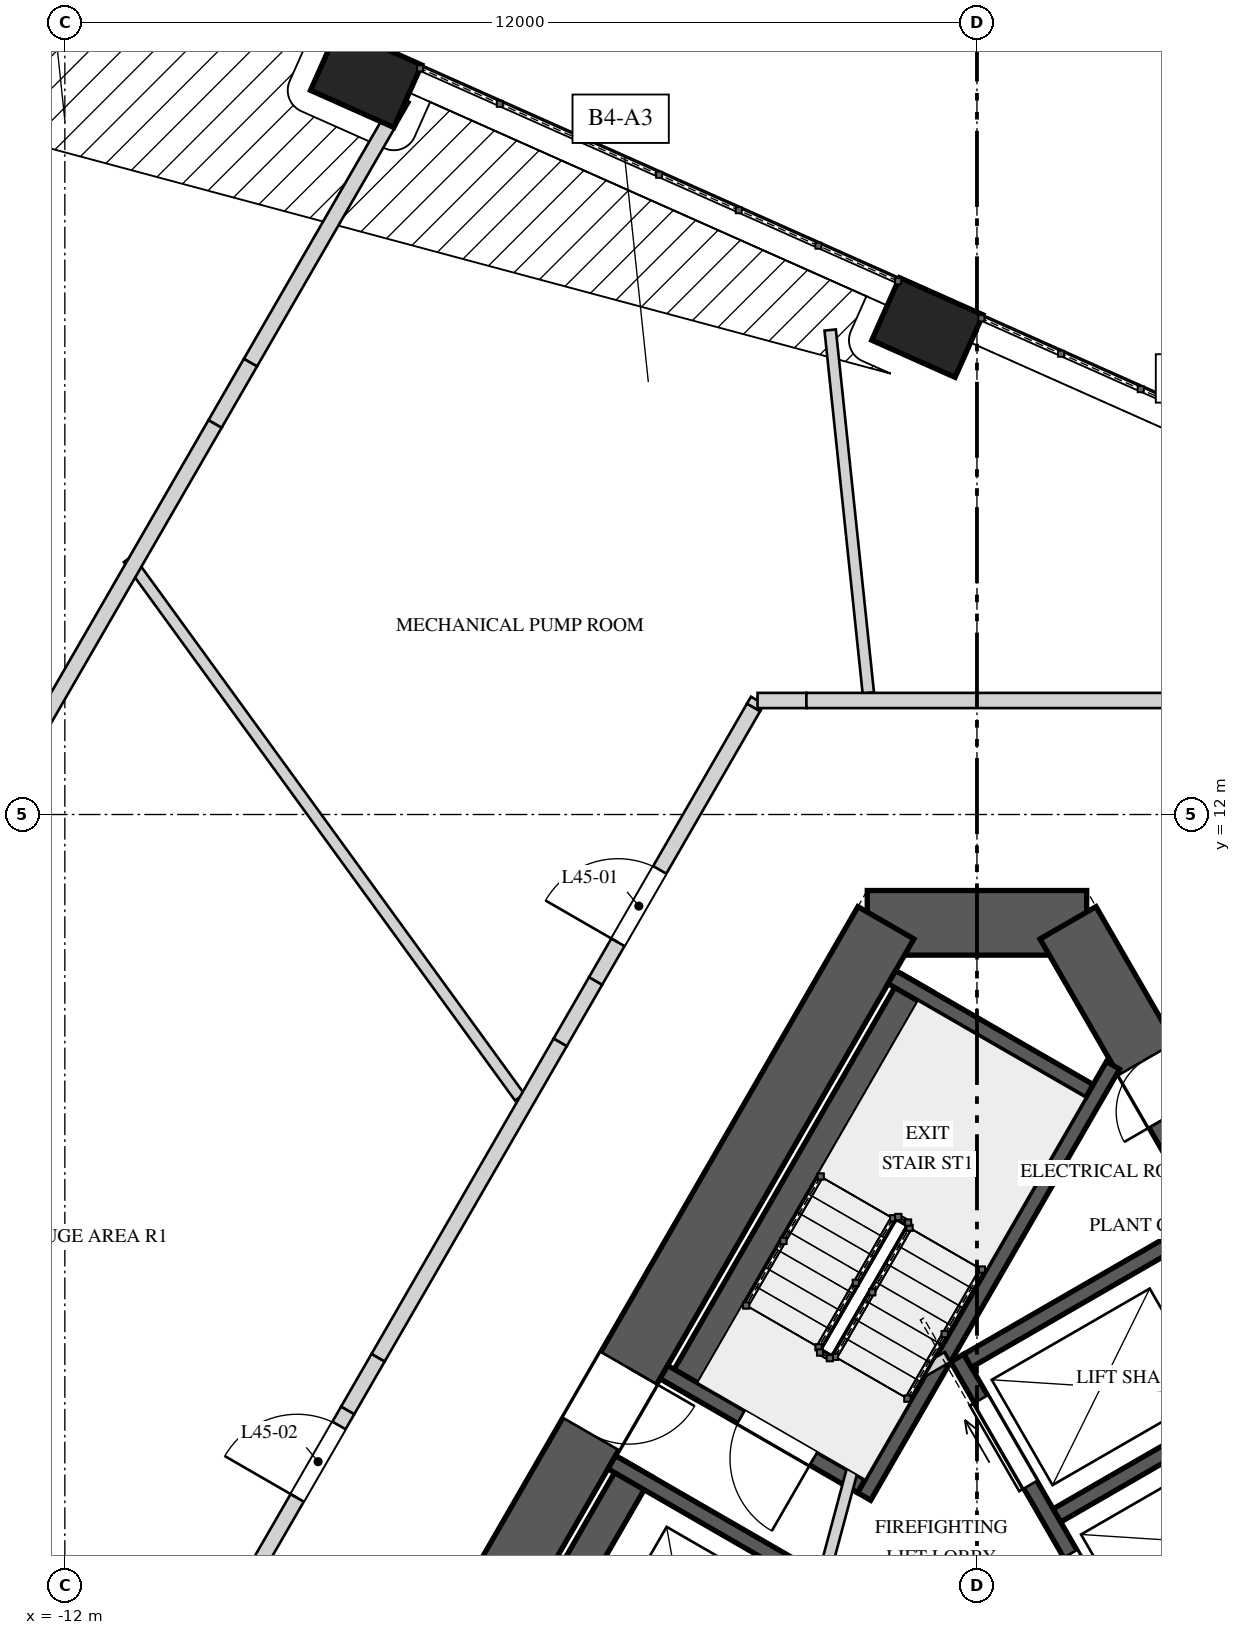
"""IFC4 building model, lengths in metres.
Left out: names, types, materials, properties, quantities, classifications, styles, units other than length and angle.
Written with IfcOpenShell. Run it as: python <this file> out.ifc"""

import sys

from ifc_helpers import new_model, si_unit, direction, frame, frame_2d, origin, origin_2d, place, context, subcontext, project, spatial, rectangle, extrude, element, fill, save


model = new_model("IFC4")
c1 = context("Model", 3, precision=1e-05, world=origin(), true_north=direction((0.0, 1.0)))
c2 = subcontext(c1, "Body", "Model", "MODEL_VIEW")
j1 = project(units=[si_unit("LENGTHUNIT", "METRE"), si_unit("PLANEANGLEUNIT", "RADIAN")], contexts=[c1])
p1 = place(None, origin())
s1 = spatial("IfcSite", under=j1, at=p1, CompositionType="ELEMENT")
p2 = place(p1, origin())
s2 = spatial("IfcBuilding", under=s1, at=p2, CompositionType="ELEMENT")
p3 = place(p2, frame((0.0, 0.0, 194.8)))
s3 = spatial("IfcBuildingStorey", under=s2, at=p3, CompositionType="ELEMENT", Elevation=194.8)
p4 = place(p3, frame((1.443, 10.575, 0.0), z_axis=(0.0, 0.0, 1.0), x_axis=(-1.0, 0.0, 0.0)))
e1 = element("IfcWall", 1, at=p4, inside=s3, PredefinedType="SHEAR", context=c2, shape_type="SweptSolid", body=[
    extrude(rectangle(XDim=2.887, YDim=0.85, at=frame_2d((1.443, 0.0))), origin(), (0.0, 0.0, 1.0), 5.2),
])
p5 = place(p3, frame((-1.198, 10.575, 0.0), z_axis=(0.0, 0.0, 1.0), x_axis=(-0.499995289315, -0.866028123483, 0.0)))
e2 = element("IfcWall", 2, at=p5, inside=s3, PredefinedType="SHEAR", context=c2, shape_type="SweptSolid", body=[
    extrude(rectangle(XDim=17.118, YDim=0.85, at=frame_2d((8.559, 0.0))), origin(), (0.0, 0.0, 1.0), 5.2),
])
p6 = place(p5, frame((6.764, 0.0, 0.0)))
e3 = element("IfcOpeningElement", 3, at=p6, cuts=e2, PredefinedType="OPENING", context=c2, shape_type="SweptSolid", body=[
    extrude(rectangle(XDim=1.0, YDim=2.4, at=frame_2d((0.5, 1.2))), frame((0.0, 0.435, 0.0), z_axis=(0.0, -1.0, 0.0), x_axis=(1.0, 0.0, 0.0)), (0.0, 0.0, 1.0), 0.87),
])
p7 = place(p3, frame((9.757, -4.25, 0.0), z_axis=(0.0, 0.0, 1.0), x_axis=(-0.499995289315, 0.866028123483, 0.0)))
e4 = element("IfcWall", 4, at=p7, inside=s3, PredefinedType="SHEAR", context=c2, shape_type="SweptSolid", body=[
    extrude(rectangle(XDim=17.118, YDim=0.85, at=frame_2d((8.559, 0.0))), origin(), (0.0, 0.0, 1.0), 5.2),
])
p8 = place(p7, frame((6.834, 0.0, 0.0)))
e5 = element("IfcOpeningElement", 5, at=p8, cuts=e4, PredefinedType="OPENING", context=c2, shape_type="SweptSolid", body=[
    extrude(rectangle(XDim=1.0, YDim=2.4, at=frame_2d((0.5, 1.2))), frame((0.0, 0.435, 0.0), z_axis=(0.0, -1.0, 0.0), x_axis=(1.0, 0.0, 0.0)), (0.0, 0.0, 1.0), 0.87),
])
p9 = place(p7, frame((14.252, 0.0, 0.0)))
e6 = element("IfcOpeningElement", 6, at=p9, cuts=e4, PredefinedType="OPENING", context=c2, shape_type="SweptSolid", body=[
    extrude(rectangle(XDim=0.8, YDim=2.1, at=frame_2d((0.4, 1.05))), frame((0.0, 0.435, 0.0), z_axis=(0.0, -1.0, 0.0), x_axis=(1.0, 0.0, 0.0)), (0.0, 0.0, 1.0), 0.87),
])
for number, where, z_axis, x_axis in (
    (7, (-0.653, 18.407, 0.0), (0.0, 0.0, 1.0), (-0.914, 0.407, 0.0)),
    (8, (-8.037, 21.694, 0.0), (0.0, 0.0, 1.0), (-0.914, 0.407, 0.0)),
):
    element("IfcColumn", number, at=place(p3, frame(where, z_axis=z_axis, x_axis=x_axis)), inside=s3, PredefinedType="COLUMN", context=c2, shape_type="SweptSolid", body=[
        extrude(rectangle(XDim=1.2, YDim=0.9, at=origin_2d()), origin(), (0.0, 0.0, 1.0), 2.835),
    ])
p10 = place(p3, frame((-0.788, 9.785, 0.0), z_axis=(0.0, 0.0, 1.0), x_axis=(-0.500009909098, -0.866019682689, 0.0)))
e9 = element("IfcWall", 9, at=p10, inside=s3, PredefinedType="SOLIDWALL", context=c2, shape_type="SweptSolid", body=[
    extrude(rectangle(XDim=6.2, YDim=0.45, at=frame_2d((3.1, 0.0))), origin(), (0.0, 0.0, 1.0), 4.85),
])
p11 = place(p3, frame((1.79, 8.7, 0.0), z_axis=(0.0, 0.0, 1.0), x_axis=(-0.499999959354, -0.866025427251, 0.0)))
e10 = element("IfcWall", 10, at=p11, inside=s3, PredefinedType="SOLIDWALL", context=c2, shape_type="SweptSolid", body=[
    extrude(rectangle(XDim=6.549, YDim=0.2, at=frame_2d((3.275, 0.0))), origin(), (0.0, 0.0, 1.0), 4.85),
])
p12 = place(p3, frame((1.479, 8.361, 0.0), z_axis=(0.0, 0.0, 1.0), x_axis=(-0.866031096941, 0.499990139034, 0.0)))
e11 = element("IfcWall", 11, at=p12, inside=s3, PredefinedType="SOLIDWALL", context=c2, shape_type="SweptSolid", body=[
    extrude(rectangle(XDim=3.0, YDim=0.2, at=frame_2d((1.5, 0.0))), origin(), (0.0, 0.0, 1.0), 4.85),
])
p13 = place(p3, frame((-1.521, 3.165, 0.0), z_axis=(0.0, 0.0, 1.0), x_axis=(-0.866031096941, 0.499990139034, 0.0)))
e12 = element("IfcWall", 12, at=p13, inside=s3, PredefinedType="SOLIDWALL", context=c2, shape_type="SweptSolid", body=[
    extrude(rectangle(XDim=3.0, YDim=0.2, at=frame_2d((1.5, 0.0))), origin(), (0.0, 0.0, 1.0), 4.85),
])
p14 = place(p13, frame((0.725, 0.0, 0.0)))
e13 = element("IfcOpeningElement", 13, at=p14, cuts=e12, PredefinedType="OPENING", context=c2, shape_type="SweptSolid", body=[
    extrude(rectangle(XDim=1.1, YDim=2.4, at=frame_2d((0.55, 1.2))), frame((0.0, 0.11, 0.0), z_axis=(0.0, -1.0, 0.0), x_axis=(1.0, 0.0, 0.0)), (0.0, 0.0, 1.0), 0.22),
])
p15 = place(p3, frame((-4.473, 3.402, 0.0), z_axis=(0.0, 0.0, 1.0), x_axis=(-0.499996545922, -0.866027397988, 0.0)))
e14 = element("IfcWall", 14, at=p15, inside=s3, PredefinedType="SOLIDWALL", context=c2, shape_type="SweptSolid", body=[
    extrude(rectangle(XDim=5.5, YDim=0.45, at=frame_2d((2.75, 0.0))), origin(), (0.0, 0.0, 1.0), 4.85),
])
p16 = place(p3, frame((-2.38, 2.078, 0.0), z_axis=(0.0, 0.0, 1.0), x_axis=(-0.866034573852, 0.49998411664, 0.0)))
e15 = element("IfcWall", 15, at=p16, inside=s3, PredefinedType="SOLIDWALL", context=c2, shape_type="SweptSolid", body=[
    extrude(rectangle(XDim=2.8, YDim=0.2, at=frame_2d((1.4, 0.0))), origin(), (0.0, 0.0, 1.0), 4.85),
])
p17 = place(p3, frame((2.19, 0.606, 0.0), z_axis=(0.0, 0.0, 1.0), x_axis=(-0.500002801628, 0.866023786258, 0.0)))
e16 = element("IfcWall", 16, at=p17, inside=s3, PredefinedType="SOLIDWALL", context=c2, shape_type="SweptSolid", body=[
    extrude(rectangle(XDim=4.9, YDim=0.2, at=frame_2d((2.45, 0.0))), origin(), (0.0, 0.0, 1.0), 4.85),
])
p18 = place(p17, frame((0.625, 0.0, 0.0)))
e17 = element("IfcOpeningElement", 17, at=p18, cuts=e16, PredefinedType="OPENING", context=c2, shape_type="SweptSolid", body=[
    extrude(rectangle(XDim=1.3, YDim=2.1, at=frame_2d((0.65, 1.05))), frame((0.0, 0.11, 0.0), z_axis=(0.0, -1.0, 0.0), x_axis=(1.0, 0.0, 0.0)), (0.0, 0.0, 1.0), 0.22),
])
p19 = place(p17, frame((2.975, 0.0, 0.0)))
e18 = element("IfcOpeningElement", 18, at=p19, cuts=e16, PredefinedType="OPENING", context=c2, shape_type="SweptSolid", body=[
    extrude(rectangle(XDim=1.3, YDim=2.1, at=frame_2d((0.65, 1.05))), frame((0.0, 0.11, 0.0), z_axis=(0.0, -1.0, 0.0), x_axis=(1.0, 0.0, 0.0)), (0.0, 0.0, 1.0), 0.22),
])
for number, where, z_axis, x_axis in (
    (19, (2.227, 0.743, 0.0), (0.0, 0.0, 1.0), (0.866, 0.5, 0.0)),
    (20, (1.052, 2.778, 0.0), (0.0, 0.0, 1.0), (0.866, 0.5, 0.0)),
    (21, (-0.123, 4.813, 0.0), (0.0, 0.0, 1.0), (0.866, 0.5, 0.0)),
):
    element("IfcWall", number, at=place(p3, frame(where, z_axis=z_axis, x_axis=x_axis)), inside=s3, PredefinedType="SOLIDWALL", context=c2, shape_type="SweptSolid", body=[
        extrude(rectangle(XDim=3.6, YDim=0.2, at=frame_2d((1.8, 0.0))), origin(), (0.0, 0.0, 1.0), 4.85),
    ])
p20 = place(p3, frame((-2.178, 1.372, 0.0), z_axis=(0.0, 0.0, 1.0), x_axis=(0.258808958833, 0.96592852884, 0.0)))
e22 = element("IfcWall", 22, at=p20, inside=s3, PredefinedType="PARTITIONING", context=c2, shape_type="SweptSolid", body=[
    extrude(rectangle(XDim=2.903, YDim=0.15, at=frame_2d((1.451, 0.0))), origin(), (0.0, 0.0, 1.0), 4.85),
])
p21 = place(p3, frame((-1.51, 4.215, 0.0), z_axis=(0.0, 0.0, 1.0), x_axis=(0.866085525409, 0.49989585183, 0.0)))
e23 = element("IfcWall", 23, at=p21, inside=s3, PredefinedType="PARTITIONING", context=c2, shape_type="SweptSolid", body=[
    extrude(rectangle(XDim=1.3, YDim=0.15, at=frame_2d((0.65, 0.0))), origin(), (0.0, 0.0, 1.0), 4.85),
])
p22 = place(p3, frame((-6.016, 8.28, 0.0), z_axis=(0.0, 0.0, 1.0), x_axis=(-0.587788699653, 0.809014489709, 0.0)))
e24 = element("IfcWall", 24, at=p22, inside=s3, PredefinedType="PARTITIONING", context=c2, shape_type="SweptSolid", body=[
    extrude(rectangle(XDim=8.757, YDim=0.15, at=frame_2d((4.378, 0.0))), origin(), (0.0, 0.0, 1.0), 4.85),
])
p23 = place(p3, frame((-1.931, 18.374, 0.0), z_axis=(0.0, 0.0, 1.0), x_axis=(0.104517989015, -0.994522996201, 0.0)))
e25 = element("IfcWall", 25, at=p23, inside=s3, PredefinedType="PARTITIONING", context=c2, shape_type="SweptSolid", body=[
    extrude(rectangle(XDim=4.8, YDim=0.15, at=frame_2d((2.4, 0.0))), origin(), (0.0, 0.0, 1.0), 4.85),
])
p24 = place(p3, frame((-9.427, 2.172, 0.0), z_axis=(0.0, 0.0, 1.0), x_axis=(0.500013761451, 0.866017458461, 0.0)))
e26 = element("IfcWall", 26, at=p24, inside=s3, PredefinedType="SOLIDWALL", context=c2, shape_type="SweptSolid", body=[
    extrude(rectangle(XDim=2.297, YDim=0.2, at=frame_2d((1.149, 0.0))), origin(), (0.0, 0.0, 1.0), 4.85),
])
p25 = place(p24, frame((0.967, 0.0, 0.0)))
e27 = element("IfcOpeningElement", 27, at=p25, cuts=e26, PredefinedType="OPENING", context=c2, shape_type="SweptSolid", body=[
    extrude(rectangle(XDim=1.1, YDim=2.2, at=frame_2d((0.55, 1.1))), frame((0.0, 0.11, 0.0), z_axis=(0.0, -1.0, 0.0), x_axis=(1.0, 0.0, 0.0)), (0.0, 0.0, 1.0), 0.22),
])
p26 = place(p3, frame((-8.278, 4.162, 0.0), z_axis=(0.0, 0.0, 1.0), x_axis=(0.500109828528, 0.865961984968, 0.0)))
e28 = element("IfcWall", 28, at=p26, inside=s3, PredefinedType="SOLIDWALL", context=c2, shape_type="SweptSolid", body=[
    extrude(rectangle(XDim=0.8, YDim=0.2, at=frame_2d((0.4, 0.0))), origin(), (0.0, 0.0, 1.0), 3.95),
])
p27 = place(p3, frame((-7.878, 4.854, 0.0), z_axis=(0.0, 0.0, 1.0), x_axis=(0.499997407846, 0.86602690036, 0.0)))
e29 = element("IfcWall", 29, at=p27, inside=s3, PredefinedType="SOLIDWALL", context=c2, shape_type="SweptSolid", body=[
    extrude(rectangle(XDim=4.791, YDim=0.2, at=frame_2d((2.396, 0.0))), origin(), (0.0, 0.0, 1.0), 4.85),
])
p28 = place(p3, frame((-5.483, 9.004, 0.0), z_axis=(0.0, 0.0, 1.0), x_axis=(0.499971966783, 0.866041588165, 0.0)))
e30 = element("IfcWall", 30, at=p28, inside=s3, PredefinedType="SOLIDWALL", context=c2, shape_type="SweptSolid", body=[
    extrude(rectangle(XDim=0.932, YDim=0.2, at=frame_2d((0.466, 0.0))), origin(), (0.0, 0.0, 1.0), 3.95),
])
p29 = place(p3, frame((-5.017, 9.811, 0.0), z_axis=(0.0, 0.0, 1.0), x_axis=(0.499993700073, 0.866029041019, 0.0)))
e31 = element("IfcWall", 31, at=p29, inside=s3, PredefinedType="SOLIDWALL", context=c2, shape_type="SweptSolid", body=[
    extrude(rectangle(XDim=4.155, YDim=0.2, at=frame_2d((2.078, 0.0))), origin(), (0.0, 0.0, 1.0), 4.85),
])
p30 = place(p29, frame((0.587, 0.0, 0.0)))
e32 = element("IfcOpeningElement", 32, at=p30, cuts=e31, PredefinedType="OPENING", context=c2, shape_type="SweptSolid", body=[
    extrude(rectangle(XDim=1.1, YDim=2.2, at=frame_2d((0.55, 1.1))), frame((0.0, 0.11, 0.0), z_axis=(0.0, -1.0, 0.0), x_axis=(1.0, 0.0, 0.0)), (0.0, 0.0, 1.0), 0.22),
])
p31 = place(p3, frame((-2.939, 13.409, 0.0), z_axis=(0.0, 0.0, 1.0), x_axis=(0.500393920955, 0.865797853931, 0.0)))
e33 = element("IfcWall", 33, at=p31, inside=s3, PredefinedType="SOLIDWALL", context=c2, shape_type="SweptSolid", body=[
    extrude(rectangle(XDim=0.105, YDim=0.2, at=frame_2d((0.052, 0.0))), origin(), (0.0, 0.0, 1.0), 4.15),
])
p32 = place(p3, frame((-2.887, 13.5, 0.0), z_axis=(0.0, 0.0, 1.0), x_axis=(1.0, 0.0, 0.0)))
e34 = element("IfcWall", 34, at=p32, inside=s3, PredefinedType="SOLIDWALL", context=c2, shape_type="SweptSolid", body=[
    extrude(rectangle(XDim=0.643, YDim=0.2, at=frame_2d((0.321, 0.0))), origin(), (0.0, 0.0, 1.0), 4.15),
])
p33 = place(p3, frame((-2.244, 13.5, 0.0), z_axis=(0.0, 0.0, 1.0), x_axis=(1.0, 0.0, 0.0)))
e35 = element("IfcWall", 35, at=p33, inside=s3, PredefinedType="SOLIDWALL", context=c2, shape_type="SweptSolid", body=[
    extrude(rectangle(XDim=5.131, YDim=0.2, at=frame_2d((2.565, 0.0))), origin(), (0.0, 0.0, 1.0), 4.85),
])
p34 = place(p3, frame((-14.865, 8.753, 0.0), z_axis=(0.0, 0.0, 1.0), x_axis=(0.50000034515, 0.866025204512, 0.0)))
e36 = element("IfcWall", 36, at=p34, inside=s3, PredefinedType="SOLIDWALL", context=c2, shape_type="SweptSolid", body=[
    extrude(rectangle(XDim=9.684, YDim=0.2, at=frame_2d((4.842, 0.0))), origin(), (0.0, 0.0, 1.0), 4.85),
])
p35 = place(p34, frame((1.045, 0.0, 0.0)))
e37 = element("IfcOpeningElement", 37, at=p35, cuts=e36, PredefinedType="OPENING", context=c2, shape_type="SweptSolid", body=[
    extrude(rectangle(XDim=1.6, YDim=2.3, at=frame_2d((0.8, 1.15))), frame((0.0, 0.11, 0.0), z_axis=(0.0, -1.0, 0.0), x_axis=(1.0, 0.0, 0.0)), (0.0, 0.0, 1.0), 0.22),
])
p36 = place(p3, frame((-10.023, 17.14, 0.0), z_axis=(0.0, 0.0, 1.0), x_axis=(0.499971966783, 0.866041588165, 0.0)))
e38 = element("IfcWall", 38, at=p36, inside=s3, PredefinedType="SOLIDWALL", context=c2, shape_type="SweptSolid", body=[
    extrude(rectangle(XDim=0.932, YDim=0.2, at=frame_2d((0.466, 0.0))), origin(), (0.0, 0.0, 1.0), 3.95),
])
p37 = place(p3, frame((-9.557, 17.947, 0.0), z_axis=(0.0, 0.0, 1.0), x_axis=(0.499978660597, 0.866037723744, 0.0)))
e39 = element("IfcWall", 39, at=p37, inside=s3, PredefinedType="SOLIDWALL", context=c2, shape_type="SweptSolid", body=[
    extrude(rectangle(XDim=4.014, YDim=0.2, at=frame_2d((2.007, 0.0))), origin(), (0.0, 0.0, 1.0), 4.85),
])
p38 = place(p14, origin())
e40 = element("IfcDoor", 40, at=p38, inside=s3, OperationType="SINGLE_SWING_RIGHT", PredefinedType="DOOR", context=c2, shape_type="SweptSolid", body=[
    extrude(rectangle(XDim=1.1, YDim=2.4, at=frame_2d((0.55, 1.2))), frame((0.0, 0.025, 0.0), z_axis=(0.0, -1.0, 0.0), x_axis=(1.0, 0.0, 0.0)), (0.0, 0.0, 1.0), 0.05),
])
fill(e13, e40)
p39 = place(p18, origin())
e41 = element("IfcDoor", 41, at=p39, inside=s3, OperationType="SLIDING_TO_LEFT", PredefinedType="DOOR", context=c2, shape_type="SweptSolid", body=[
    extrude(rectangle(XDim=1.3, YDim=2.1, at=frame_2d((0.65, 1.05))), frame((0.0, 0.025, 0.0), z_axis=(0.0, -1.0, 0.0), x_axis=(1.0, 0.0, 0.0)), (0.0, 0.0, 1.0), 0.05),
])
fill(e17, e41)
p40 = place(p19, origin())
e42 = element("IfcDoor", 42, at=p40, inside=s3, OperationType="SLIDING_TO_RIGHT", PredefinedType="DOOR", context=c2, shape_type="SweptSolid", body=[
    extrude(rectangle(XDim=1.3, YDim=2.1, at=frame_2d((0.65, 1.05))), frame((0.0, 0.025, 0.0), z_axis=(0.0, -1.0, 0.0), x_axis=(1.0, 0.0, 0.0)), (0.0, 0.0, 1.0), 0.05),
])
fill(e18, e42)
p41 = place(p6, origin())
e43 = element("IfcDoor", 43, at=p41, inside=s3, OperationType="SINGLE_SWING_RIGHT", PredefinedType="DOOR", context=c2, shape_type="SweptSolid", body=[
    extrude(rectangle(XDim=1.0, YDim=2.4, at=frame_2d((0.5, 1.2))), frame((0.0, 0.025, 0.0), z_axis=(0.0, -1.0, 0.0), x_axis=(1.0, 0.0, 0.0)), (0.0, 0.0, 1.0), 0.05),
])
fill(e3, e43)
p42 = place(p9, origin())
e44 = element("IfcDoor", 44, at=p42, inside=s3, OperationType="SINGLE_SWING_RIGHT", PredefinedType="DOOR", context=c2, shape_type="SweptSolid", body=[
    extrude(rectangle(XDim=0.8, YDim=2.1, at=frame_2d((0.4, 1.05))), frame((0.0, 0.025, 0.0), z_axis=(0.0, -1.0, 0.0), x_axis=(1.0, 0.0, 0.0)), (0.0, 0.0, 1.0), 0.05),
])
fill(e6, e44)
p43 = place(p30, origin())
e45 = element("IfcDoor", 45, at=p43, inside=s3, OperationType="SINGLE_SWING_LEFT", PredefinedType="DOOR", context=c2, shape_type="SweptSolid", body=[
    extrude(rectangle(XDim=1.1, YDim=2.2, at=frame_2d((0.55, 1.1))), frame((0.0, 0.025, 0.0), z_axis=(0.0, -1.0, 0.0), x_axis=(1.0, 0.0, 0.0)), (0.0, 0.0, 1.0), 0.05),
])
fill(e32, e45)
p44 = place(p25, origin())
e46 = element("IfcDoor", 46, at=p44, inside=s3, OperationType="SINGLE_SWING_RIGHT", PredefinedType="DOOR", context=c2, shape_type="SweptSolid", body=[
    extrude(rectangle(XDim=1.1, YDim=2.2, at=frame_2d((0.55, 1.1))), frame((0.0, 0.025, 0.0), z_axis=(0.0, -1.0, 0.0), x_axis=(1.0, 0.0, 0.0)), (0.0, 0.0, 1.0), 0.05),
])
fill(e27, e46)
save(model, sys.argv[1])
